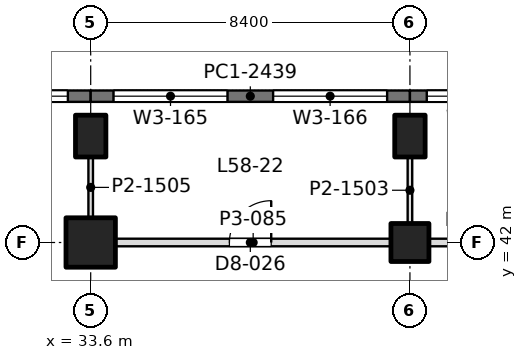
"""IFC4 building model, lengths in metres.
Left out: names, types, materials, properties, quantities, classifications, styles, units other than length and angle.
Written with IfcOpenShell. Run it as: python <this file> out.ifc"""

import sys

from ifc_helpers import new_model, si_unit, direction, frame, frame_2d, origin, origin_2d, place, context, subcontext, project, spatial, rectangle, extrude, element, fill, save


model = new_model("IFC4")
c1 = context("Model", 3, precision=1e-05, world=origin(), true_north=direction((0.0, 1.0)))
c2 = subcontext(c1, "Body", "Model", "MODEL_VIEW")
j1 = project(units=[si_unit("LENGTHUNIT", "METRE"), si_unit("PLANEANGLEUNIT", "RADIAN")], contexts=[c1])
p1 = place(None, origin())
s1 = spatial("IfcSite", under=j1, at=p1, CompositionType="ELEMENT")
p2 = place(p1, origin())
s2 = spatial("IfcBuilding", under=s1, at=p2, CompositionType="ELEMENT")
p3 = place(p2, frame((0.0, 0.0, 254.7)))
s3 = spatial("IfcBuildingStorey", under=s2, at=p3, CompositionType="ELEMENT", Elevation=254.7)
p4 = place(p3, frame((33.6, 42.0, 0.0), z_axis=(0.0, 0.0, 1.0), x_axis=(1.0, 0.0, 0.0)))
e1 = element("IfcColumn", 1, at=p4, inside=s3, PredefinedType="COLUMN", context=c2, shape_type="SweptSolid", body=[
    extrude(rectangle(XDim=1.3, YDim=1.3, at=origin_2d()), origin(), (0.0, 0.0, 1.0), 4.5),
])
p5 = place(p3, frame((33.6, 44.8, 0.0), z_axis=(0.0, 0.0, 1.0), x_axis=(1.0, 0.0, 0.0)))
e2 = element("IfcColumn", 2, at=p5, inside=s3, PredefinedType="COLUMN", context=c2, shape_type="SweptSolid", body=[
    extrude(rectangle(XDim=0.8, YDim=1.1, at=origin_2d()), origin(), (0.0, 0.0, 1.0), 4.5),
])
p6 = place(p3, frame((42.0, 42.0, 0.0), z_axis=(0.0, 0.0, 1.0), x_axis=(1.0, 0.0, 0.0)))
e3 = element("IfcColumn", 3, at=p6, inside=s3, PredefinedType="COLUMN", context=c2, shape_type="SweptSolid", body=[
    extrude(rectangle(XDim=1.0, YDim=1.0, at=origin_2d()), origin(), (0.0, 0.0, 1.0), 4.5),
])
p7 = place(p3, frame((42.0, 44.8, 0.0), z_axis=(0.0, 0.0, 1.0), x_axis=(1.0, 0.0, 0.0)))
e4 = element("IfcColumn", 4, at=p7, inside=s3, PredefinedType="COLUMN", context=c2, shape_type="SweptSolid", body=[
    extrude(rectangle(XDim=0.8, YDim=1.1, at=origin_2d()), origin(), (0.0, 0.0, 1.0), 4.5),
])
p8 = place(p3, frame((25.2, 45.85, 0.0), z_axis=(0.0, 0.0, 1.0), x_axis=(1.0, 0.0, 0.0)))
e5 = element("IfcWall", 5, at=p8, inside=s3, PredefinedType="SOLIDWALL", context=c2, shape_type="SweptSolid", body=[
    extrude(rectangle(XDim=8.4, YDim=0.3, at=frame_2d((4.2, 0.0))), origin(), (0.0, 0.0, 1.0), 4.35),
])
p9 = place(p8, frame((0.6, 0.0, 0.9)))
e6 = element("IfcOpeningElement", 6, at=p9, cuts=e5, PredefinedType="OPENING", context=c2, shape_type="SweptSolid", body=[
    extrude(rectangle(XDim=3.0, YDim=2.4, at=frame_2d((1.5, 1.2))), frame((0.0, 0.16, 0.0), z_axis=(0.0, -1.0, 0.0), x_axis=(1.0, 0.0, 0.0)), (0.0, 0.0, 1.0), 0.32),
])
p10 = place(p8, frame((4.8, 0.0, 0.9)))
e7 = element("IfcOpeningElement", 7, at=p10, cuts=e5, PredefinedType="OPENING", context=c2, shape_type="SweptSolid", body=[
    extrude(rectangle(XDim=3.0, YDim=2.4, at=frame_2d((1.5, 1.2))), frame((0.0, 0.16, 0.0), z_axis=(0.0, -1.0, 0.0), x_axis=(1.0, 0.0, 0.0)), (0.0, 0.0, 1.0), 0.32),
])
p11 = place(p3, frame((33.6, 45.85, 0.0), z_axis=(0.0, 0.0, 1.0), x_axis=(1.0, 0.0, 0.0)))
e8 = element("IfcWall", 8, at=p11, inside=s3, PredefinedType="SOLIDWALL", context=c2, shape_type="SweptSolid", body=[
    extrude(rectangle(XDim=8.4, YDim=0.3, at=frame_2d((4.2, 0.0))), origin(), (0.0, 0.0, 1.0), 4.35),
])
p12 = place(p11, frame((0.6, 0.0, 0.9)))
e9 = element("IfcOpeningElement", 9, at=p12, cuts=e8, PredefinedType="OPENING", context=c2, shape_type="SweptSolid", body=[
    extrude(rectangle(XDim=3.0, YDim=2.4, at=frame_2d((1.5, 1.2))), frame((0.0, 0.16, 0.0), z_axis=(0.0, -1.0, 0.0), x_axis=(1.0, 0.0, 0.0)), (0.0, 0.0, 1.0), 0.32),
])
p13 = place(p11, frame((4.8, 0.0, 0.9)))
e10 = element("IfcOpeningElement", 10, at=p13, cuts=e8, PredefinedType="OPENING", context=c2, shape_type="SweptSolid", body=[
    extrude(rectangle(XDim=3.0, YDim=2.4, at=frame_2d((1.5, 1.2))), frame((0.0, 0.16, 0.0), z_axis=(0.0, -1.0, 0.0), x_axis=(1.0, 0.0, 0.0)), (0.0, 0.0, 1.0), 0.32),
])
p14 = place(p3, frame((42.0, 45.85, 0.0), z_axis=(0.0, 0.0, 1.0), x_axis=(1.0, 0.0, 0.0)))
e11 = element("IfcWall", 11, at=p14, inside=s3, PredefinedType="SOLIDWALL", context=c2, shape_type="SweptSolid", body=[
    extrude(rectangle(XDim=8.085, YDim=0.3, at=frame_2d((4.042, 0.0))), origin(), (0.0, 0.0, 1.0), 4.35),
])
p15 = place(p14, frame((0.443, 0.0, 0.9)))
e12 = element("IfcOpeningElement", 12, at=p15, cuts=e11, PredefinedType="OPENING", context=c2, shape_type="SweptSolid", body=[
    extrude(rectangle(XDim=3.0, YDim=2.4, at=frame_2d((1.5, 1.2))), frame((0.0, 0.16, 0.0), z_axis=(0.0, -1.0, 0.0), x_axis=(1.0, 0.0, 0.0)), (0.0, 0.0, 1.0), 0.32),
])
p16 = place(p14, frame((4.643, 0.0, 0.9)))
e13 = element("IfcOpeningElement", 13, at=p16, cuts=e11, PredefinedType="OPENING", context=c2, shape_type="SweptSolid", body=[
    extrude(rectangle(XDim=3.0, YDim=2.4, at=frame_2d((1.5, 1.2))), frame((0.0, 0.16, 0.0), z_axis=(0.0, -1.0, 0.0), x_axis=(1.0, 0.0, 0.0)), (0.0, 0.0, 1.0), 0.32),
])
p17 = place(p3, frame((34.249, 42.0, 0.0), z_axis=(0.0, 0.0, 1.0), x_axis=(1.0, 0.0, 0.0)))
e14 = element("IfcWall", 14, at=p17, inside=s3, PredefinedType="PARTITIONING", context=c2, shape_type="SweptSolid", body=[
    extrude(rectangle(XDim=7.252, YDim=0.2, at=frame_2d((3.626, 0.0))), origin(), (0.0, 0.0, 1.0), 3.8),
])
p18 = place(p17, frame((3.001, 0.0, 0.0)))
e15 = element("IfcOpeningElement", 15, at=p18, cuts=e14, PredefinedType="OPENING", context=c2, shape_type="SweptSolid", body=[
    extrude(rectangle(XDim=1.1, YDim=2.4, at=frame_2d((0.55, 1.2))), frame((0.0, 0.11, 0.0), z_axis=(0.0, -1.0, 0.0), x_axis=(1.0, 0.0, 0.0)), (0.0, 0.0, 1.0), 0.22),
])
p19 = place(p3, frame((42.499, 42.0, 0.0), z_axis=(0.0, 0.0, 1.0), x_axis=(1.0, 0.0, 0.0)))
e16 = element("IfcWall", 16, at=p19, inside=s3, PredefinedType="PARTITIONING", context=c2, shape_type="SweptSolid", body=[
    extrude(rectangle(XDim=7.352, YDim=0.2, at=frame_2d((3.676, 0.0))), origin(), (0.0, 0.0, 1.0), 3.8),
])
p20 = place(p19, frame((1.051, 0.0, 0.0)))
e17 = element("IfcOpeningElement", 17, at=p20, cuts=e16, PredefinedType="OPENING", context=c2, shape_type="SweptSolid", body=[
    extrude(rectangle(XDim=1.1, YDim=2.4, at=frame_2d((0.55, 1.2))), frame((0.0, 0.11, 0.0), z_axis=(0.0, -1.0, 0.0), x_axis=(1.0, 0.0, 0.0)), (0.0, 0.0, 1.0), 0.22),
])
p21 = place(p19, frame((5.701, 0.0, 0.0)))
e18 = element("IfcOpeningElement", 18, at=p21, cuts=e16, PredefinedType="OPENING", context=c2, shape_type="SweptSolid", body=[
    extrude(rectangle(XDim=1.1, YDim=2.4, at=frame_2d((0.55, 1.2))), frame((0.0, 0.11, 0.0), z_axis=(0.0, -1.0, 0.0), x_axis=(1.0, 0.0, 0.0)), (0.0, 0.0, 1.0), 0.22),
])
p22 = place(p3, frame((33.6, 42.649, 0.0), z_axis=(0.0, 0.0, 1.0), x_axis=(0.0, 1.0, 0.0)))
e19 = element("IfcWall", 19, at=p22, inside=s3, PredefinedType="PARTITIONING", context=c2, shape_type="SweptSolid", body=[
    extrude(rectangle(XDim=1.602, YDim=0.12, at=frame_2d((0.801, 0.0))), origin(), (0.0, 0.0, 1.0), 3.99),
])
p23 = place(p3, frame((42.0, 42.499, 0.0), z_axis=(0.0, 0.0, 1.0), x_axis=(0.0, 1.0, 0.0)))
e20 = element("IfcWall", 20, at=p23, inside=s3, PredefinedType="PARTITIONING", context=c2, shape_type="SweptSolid", body=[
    extrude(rectangle(XDim=1.752, YDim=0.12, at=frame_2d((0.876, 0.0))), origin(), (0.0, 0.0, 1.0), 3.99),
])
p24 = place(p10, origin())
e21 = element("IfcWindow", 21, at=p24, inside=s3, PartitioningType="SINGLE_PANEL", PredefinedType="WINDOW", context=c2, shape_type="SweptSolid", body=[
    extrude(rectangle(XDim=3.0, YDim=2.4, at=frame_2d((1.5, 1.2))), frame((0.0, 0.03, 0.0), z_axis=(0.0, -1.0, 0.0), x_axis=(1.0, 0.0, 0.0)), (0.0, 0.0, 1.0), 0.06),
])
fill(e7, e21)
p25 = place(p12, origin())
e22 = element("IfcWindow", 22, at=p25, inside=s3, PartitioningType="SINGLE_PANEL", PredefinedType="WINDOW", context=c2, shape_type="SweptSolid", body=[
    extrude(rectangle(XDim=3.0, YDim=2.4, at=frame_2d((1.5, 1.2))), frame((0.0, 0.03, 0.0), z_axis=(0.0, -1.0, 0.0), x_axis=(1.0, 0.0, 0.0)), (0.0, 0.0, 1.0), 0.06),
])
fill(e9, e22)
p26 = place(p13, origin())
e23 = element("IfcWindow", 23, at=p26, inside=s3, PartitioningType="SINGLE_PANEL", PredefinedType="WINDOW", context=c2, shape_type="SweptSolid", body=[
    extrude(rectangle(XDim=3.0, YDim=2.4, at=frame_2d((1.5, 1.2))), frame((0.0, 0.03, 0.0), z_axis=(0.0, -1.0, 0.0), x_axis=(1.0, 0.0, 0.0)), (0.0, 0.0, 1.0), 0.06),
])
fill(e10, e23)
p27 = place(p15, origin())
e24 = element("IfcWindow", 24, at=p27, inside=s3, PartitioningType="SINGLE_PANEL", PredefinedType="WINDOW", context=c2, shape_type="SweptSolid", body=[
    extrude(rectangle(XDim=3.0, YDim=2.4, at=frame_2d((1.5, 1.2))), frame((0.0, 0.03, 0.0), z_axis=(0.0, -1.0, 0.0), x_axis=(1.0, 0.0, 0.0)), (0.0, 0.0, 1.0), 0.06),
])
fill(e12, e24)
p28 = place(p18, origin())
e25 = element("IfcDoor", 25, at=p28, inside=s3, OperationType="SINGLE_SWING_RIGHT", PredefinedType="DOOR", context=c2, shape_type="SweptSolid", body=[
    extrude(rectangle(XDim=1.1, YDim=2.4, at=frame_2d((0.55, 1.2))), frame((0.0, 0.025, 0.0), z_axis=(0.0, -1.0, 0.0), x_axis=(1.0, 0.0, 0.0)), (0.0, 0.0, 1.0), 0.05),
])
fill(e15, e25)
save(model, sys.argv[1])
